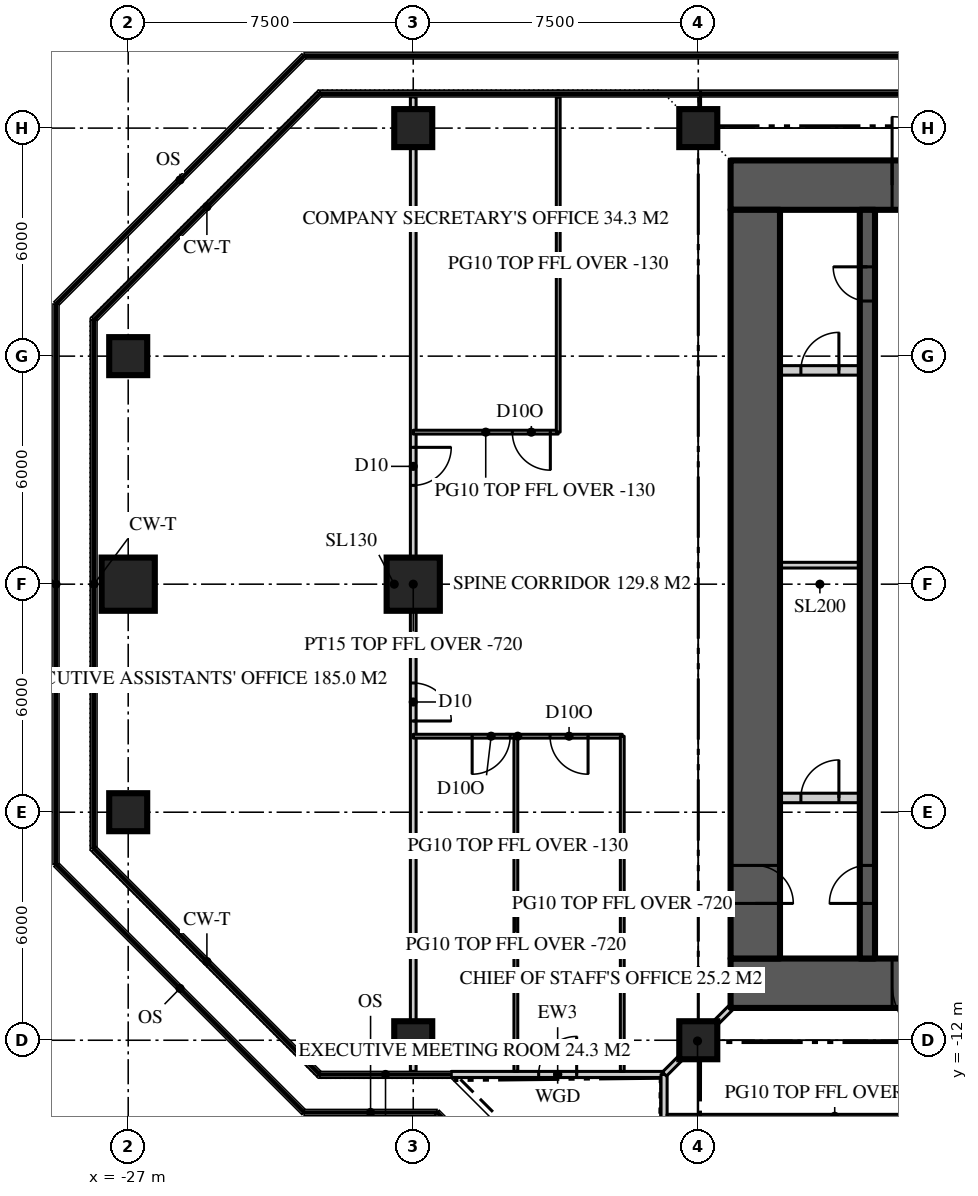
"""IFC4 building model, lengths in metres.
Left out: names, types, materials, properties, quantities, classifications, styles, units other than length and angle.
Written with IfcOpenShell. Run it as: python <this file> out.ifc"""

import sys

from ifc_helpers import new_model, si_unit, direction, frame, frame_2d, origin, origin_2d, place, context, subcontext, project, spatial, rectangle, extrude, element, fill, save


model = new_model("IFC4")
c1 = context("Model", 3, precision=1e-05, world=origin(), true_north=direction((0.0, 1.0)))
c2 = subcontext(c1, "Body", "Model", "MODEL_VIEW")
j1 = project(units=[si_unit("LENGTHUNIT", "METRE"), si_unit("PLANEANGLEUNIT", "RADIAN")], contexts=[c1])
p1 = place(None, origin())
s1 = spatial("IfcSite", under=j1, at=p1, CompositionType="ELEMENT")
p2 = place(p1, origin())
s2 = spatial("IfcBuilding", under=s1, at=p2, CompositionType="ELEMENT")
p3 = place(p2, frame((0.0, 0.0, 290.7)))
s3 = spatial("IfcBuildingStorey", under=s2, at=p3, CompositionType="ELEMENT", Elevation=290.7)
p4 = place(p3, frame((-11.15, 10.5, 0.0), z_axis=(0.0, 0.0, 1.0), x_axis=(1.0, 0.0, 0.0)))
e1 = element("IfcWall", 1, at=p4, inside=s3, PredefinedType="SHEAR", context=c2, shape_type="SweptSolid", body=[
    extrude(rectangle(XDim=22.3, YDim=1.3, at=frame_2d((11.15, 0.0))), origin(), (0.0, 0.0, 1.0), 3.9),
])
p5 = place(p4, frame((4.25, 0.0, 0.0)))
e2 = element("IfcOpeningElement", 2, at=p5, cuts=e1, PredefinedType="OPENING", context=c2, shape_type="SweptSolid", body=[
    extrude(rectangle(XDim=1.8, YDim=2.2, at=frame_2d((0.9, 1.1))), frame((0.0, 0.66, 0.0), z_axis=(0.0, -1.0, 0.0), x_axis=(1.0, 0.0, 0.0)), (0.0, 0.0, 1.0), 1.32),
])
p6 = place(p4, frame((16.25, 0.0, 0.0)))
e3 = element("IfcOpeningElement", 3, at=p6, cuts=e1, PredefinedType="OPENING", context=c2, shape_type="SweptSolid", body=[
    extrude(rectangle(XDim=1.8, YDim=2.2, at=frame_2d((0.9, 1.1))), frame((0.0, 0.66, 0.0), z_axis=(0.0, -1.0, 0.0), x_axis=(1.0, 0.0, 0.0)), (0.0, 0.0, 1.0), 1.32),
])
p7 = place(p3, frame((11.15, -10.5, 0.0), z_axis=(0.0, 0.0, 1.0), x_axis=(-1.0, 0.0, 0.0)))
e4 = element("IfcWall", 4, at=p7, inside=s3, PredefinedType="SHEAR", context=c2, shape_type="SweptSolid", body=[
    extrude(rectangle(XDim=22.3, YDim=1.3, at=frame_2d((11.15, 0.0))), origin(), (0.0, 0.0, 1.0), 3.9),
])
p8 = place(p7, frame((16.25, 0.0, 0.0)))
e5 = element("IfcOpeningElement", 5, at=p8, cuts=e4, PredefinedType="OPENING", context=c2, shape_type="SweptSolid", body=[
    extrude(rectangle(XDim=1.8, YDim=2.2, at=frame_2d((0.9, 1.1))), frame((0.0, 0.66, 0.0), z_axis=(0.0, -1.0, 0.0), x_axis=(1.0, 0.0, 0.0)), (0.0, 0.0, 1.0), 1.32),
])
p9 = place(p7, frame((4.25, 0.0, 0.0)))
e6 = element("IfcOpeningElement", 6, at=p9, cuts=e4, PredefinedType="OPENING", context=c2, shape_type="SweptSolid", body=[
    extrude(rectangle(XDim=1.8, YDim=2.2, at=frame_2d((0.9, 1.1))), frame((0.0, 0.66, 0.0), z_axis=(0.0, -1.0, 0.0), x_axis=(1.0, 0.0, 0.0)), (0.0, 0.0, 1.0), 1.32),
])
p10 = place(p3, frame((-10.5, 9.85, 0.0), z_axis=(0.0, 0.0, 1.0), x_axis=(0.0, -1.0, 0.0)))
e7 = element("IfcWall", 7, at=p10, inside=s3, PredefinedType="SHEAR", context=c2, shape_type="SweptSolid", body=[
    extrude(rectangle(XDim=19.7, YDim=1.3, at=frame_2d((9.85, 0.0))), origin(), (0.0, 0.0, 1.0), 3.9),
])
p11 = place(p10, frame((17.25, 0.0, 0.0)))
e8 = element("IfcOpeningElement", 8, at=p11, cuts=e7, PredefinedType="OPENING", context=c2, shape_type="SweptSolid", body=[
    extrude(rectangle(XDim=1.0, YDim=2.2, at=frame_2d((0.5, 1.1))), frame((0.0, 0.66, 0.0), z_axis=(0.0, -1.0, 0.0), x_axis=(1.0, 0.0, 0.0)), (0.0, 0.0, 1.0), 1.32),
])
for number, where, z_axis, x_axis in (
    (9, (-19.5, -12.0, 0.0), (0.0, 0.0, 1.0), (1.0, 0.0, 0.0)),
    (10, (-12.0, -12.0, 0.0), (0.0, 0.0, 1.0), (1.0, 0.0, 0.0)),
    (11, (-27.0, -6.0, 0.0), (0.0, 0.0, 1.0), (1.0, 0.0, 0.0)),
):
    element("IfcColumn", number, at=place(p3, frame(where, z_axis=z_axis, x_axis=x_axis)), inside=s3, PredefinedType="COLUMN", context=c2, shape_type="SweptSolid", body=[
        extrude(rectangle(XDim=1.0, YDim=1.0, at=origin_2d()), origin(), (0.0, 0.0, 1.0), 3.9),
    ])
for number, where, z_axis, x_axis in (
    (12, (-27.0, 0.0, 0.0), (0.0, 0.0, 1.0), (1.0, 0.0, 0.0)),
    (13, (-19.5, 0.0, 0.0), (0.0, 0.0, 1.0), (1.0, 0.0, 0.0)),
):
    element("IfcColumn", number, at=place(p3, frame(where, z_axis=z_axis, x_axis=x_axis)), inside=s3, PredefinedType="COLUMN", context=c2, shape_type="SweptSolid", body=[
        extrude(rectangle(XDim=1.4, YDim=1.4, at=origin_2d()), origin(), (0.0, 0.0, 1.0), 3.9),
    ])
for number, where, z_axis, x_axis in (
    (14, (-27.0, 6.0, 0.0), (0.0, 0.0, 1.0), (1.0, 0.0, 0.0)),
    (15, (-19.5, 12.0, 0.0), (0.0, 0.0, 1.0), (1.0, 0.0, 0.0)),
    (16, (-12.0, 12.0, 0.0), (0.0, 0.0, 1.0), (1.0, 0.0, 0.0)),
):
    element("IfcColumn", number, at=place(p3, frame(where, z_axis=z_axis, x_axis=x_axis)), inside=s3, PredefinedType="COLUMN", context=c2, shape_type="SweptSolid", body=[
        extrude(rectangle(XDim=1.0, YDim=1.0, at=origin_2d()), origin(), (0.0, 0.0, 1.0), 3.9),
    ])
p12 = place(p3, frame((-18.5, -12.9, 0.0), z_axis=(0.0, 0.0, 1.0), x_axis=(1.0, 0.0, 0.0)))
e17 = element("IfcWall", 17, at=p12, inside=s3, PredefinedType="SOLIDWALL", context=c2, shape_type="SweptSolid", body=[
    extrude(rectangle(XDim=5.6, YDim=0.16, at=frame_2d((2.8, 0.0))), origin(), (0.0, 0.0, 1.0), 3.77),
])
p13 = place(p12, frame((2.3, 0.0, 0.0)))
e18 = element("IfcOpeningElement", 18, at=p13, cuts=e17, PredefinedType="OPENING", context=c2, shape_type="SweptSolid", body=[
    extrude(rectangle(XDim=1.0, YDim=2.2, at=frame_2d((0.5, 1.1))), frame((0.0, 0.09, 0.0), z_axis=(0.0, -1.0, 0.0), x_axis=(1.0, 0.0, 0.0)), (0.0, 0.0, 1.0), 0.18),
])
p14 = place(p3, frame((-12.9, -12.9, 0.0), z_axis=(0.0, 0.0, 1.0), x_axis=(0.0, -1.0, 0.0)))
e19 = element("IfcWall", 19, at=p14, inside=s3, PredefinedType="SOLIDWALL", context=c2, shape_type="SweptSolid", body=[
    extrude(rectangle(XDim=5.6, YDim=0.16, at=frame_2d((2.8, 0.0))), origin(), (0.0, 0.0, 1.0), 3.77),
])
p15 = place(p3, frame((-7.55, -9.85, 0.0), z_axis=(0.0, 0.0, 1.0), x_axis=(0.0, 1.0, 0.0)))
e20 = element("IfcWall", 20, at=p15, inside=s3, PredefinedType="SHEAR", context=c2, shape_type="SweptSolid", body=[
    extrude(rectangle(XDim=19.7, YDim=0.4, at=frame_2d((9.85, 0.0))), origin(), (0.0, 0.0, 1.0), 3.9),
])
p16 = place(p15, frame((1.45, 0.0, 0.0)))
e21 = element("IfcOpeningElement", 21, at=p16, cuts=e20, PredefinedType="OPENING", context=c2, shape_type="SweptSolid", body=[
    extrude(rectangle(XDim=1.0, YDim=2.2, at=frame_2d((0.5, 1.1))), frame((0.0, 0.21, 0.0), z_axis=(0.0, -1.0, 0.0), x_axis=(1.0, 0.0, 0.0)), (0.0, 0.0, 1.0), 0.42),
])
p17 = place(p15, frame((17.3, 0.0, 0.0)))
e22 = element("IfcOpeningElement", 22, at=p17, cuts=e20, PredefinedType="OPENING", context=c2, shape_type="SweptSolid", body=[
    extrude(rectangle(XDim=0.9, YDim=2.1, at=frame_2d((0.45, 1.05))), frame((0.0, 0.21, 0.0), z_axis=(0.0, -1.0, 0.0), x_axis=(1.0, 0.0, 0.0)), (0.0, 0.0, 1.0), 0.42),
])
p18 = place(p3, frame((-9.85, 5.625, 0.0), z_axis=(0.0, 0.0, 1.0), x_axis=(1.0, 0.0, 0.0)))
e23 = element("IfcWall", 23, at=p18, inside=s3, PredefinedType="SOLIDWALL", context=c2, shape_type="SweptSolid", body=[
    extrude(rectangle(XDim=2.1, YDim=0.25, at=frame_2d((1.05, 0.0))), origin(), (0.0, 0.0, 1.0), 3.7),
])
p19 = place(p18, frame((0.55, 0.0, 0.0)))
e24 = element("IfcOpeningElement", 24, at=p19, cuts=e23, PredefinedType="OPENING", context=c2, shape_type="SweptSolid", body=[
    extrude(rectangle(XDim=1.0, YDim=2.2, at=frame_2d((0.5, 1.1))), frame((0.0, 0.135, 0.0), z_axis=(0.0, -1.0, 0.0), x_axis=(1.0, 0.0, 0.0)), (0.0, 0.0, 1.0), 0.27),
])
p20 = place(p3, frame((-9.85, -5.625, 0.0), z_axis=(0.0, 0.0, 1.0), x_axis=(1.0, 0.0, 0.0)))
e25 = element("IfcWall", 25, at=p20, inside=s3, PredefinedType="SOLIDWALL", context=c2, shape_type="SweptSolid", body=[
    extrude(rectangle(XDim=2.1, YDim=0.25, at=frame_2d((1.05, 0.0))), origin(), (0.0, 0.0, 1.0), 3.7),
])
p21 = place(p20, frame((0.55, 0.0, 0.0)))
e26 = element("IfcOpeningElement", 26, at=p21, cuts=e25, PredefinedType="OPENING", context=c2, shape_type="SweptSolid", body=[
    extrude(rectangle(XDim=1.0, YDim=2.2, at=frame_2d((0.5, 1.1))), frame((0.0, 0.135, 0.0), z_axis=(0.0, -1.0, 0.0), x_axis=(1.0, 0.0, 0.0)), (0.0, 0.0, 1.0), 0.27),
])
p22 = place(p3, frame((-19.5, 12.82, 0.0), z_axis=(0.0, 0.0, 1.0), x_axis=(0.0, -1.0, 0.0)))
e27 = element("IfcWall", 27, at=p22, inside=s3, PredefinedType="PARTITIONING", context=c2, shape_type="SweptSolid", body=[
    extrude(rectangle(XDim=25.64, YDim=0.15, at=frame_2d((12.82, 0.0))), origin(), (0.0, 0.0, 1.0), 3.18),
])
p23 = place(p22, frame((15.42, 0.0, 0.0)))
e28 = element("IfcOpeningElement", 28, at=p23, cuts=e27, PredefinedType="OPENING", context=c2, shape_type="SweptSolid", body=[
    extrude(rectangle(XDim=1.0, YDim=2.2, at=frame_2d((0.5, 1.1))), frame((0.0, 0.085, 0.0), z_axis=(0.0, -1.0, 0.0), x_axis=(1.0, 0.0, 0.0)), (0.0, 0.0, 1.0), 0.17),
])
p24 = place(p22, frame((9.22, 0.0, 0.0)))
e29 = element("IfcOpeningElement", 29, at=p24, cuts=e27, PredefinedType="OPENING", context=c2, shape_type="SweptSolid", body=[
    extrude(rectangle(XDim=1.0, YDim=2.2, at=frame_2d((0.5, 1.1))), frame((0.0, 0.085, 0.0), z_axis=(0.0, -1.0, 0.0), x_axis=(1.0, 0.0, 0.0)), (0.0, 0.0, 1.0), 0.17),
])
p25 = place(p3, frame((-14.0, -4.0, 0.0), z_axis=(0.0, 0.0, 1.0), x_axis=(-1.0, 0.0, 0.0)))
e30 = element("IfcWall", 30, at=p25, inside=s3, PredefinedType="PARTITIONING", context=c2, shape_type="SweptSolid", body=[
    extrude(rectangle(XDim=5.5, YDim=0.1, at=frame_2d((2.75, 0.0))), origin(), (0.0, 0.0, 1.0), 3.77),
])
p26 = place(p25, frame((0.9, 0.0, 0.0)))
e31 = element("IfcOpeningElement", 31, at=p26, cuts=e30, PredefinedType="OPENING", context=c2, shape_type="SweptSolid", body=[
    extrude(rectangle(XDim=1.0, YDim=2.2, at=frame_2d((0.5, 1.1))), frame((0.0, 0.06, 0.0), z_axis=(0.0, -1.0, 0.0), x_axis=(1.0, 0.0, 0.0)), (0.0, 0.0, 1.0), 0.12),
])
p27 = place(p25, frame((2.95, 0.0, 0.0)))
e32 = element("IfcOpeningElement", 32, at=p27, cuts=e30, PredefinedType="OPENING", context=c2, shape_type="SweptSolid", body=[
    extrude(rectangle(XDim=1.0, YDim=2.2, at=frame_2d((0.5, 1.1))), frame((0.0, 0.06, 0.0), z_axis=(0.0, -1.0, 0.0), x_axis=(1.0, 0.0, 0.0)), (0.0, 0.0, 1.0), 0.12),
])
for number, where, z_axis, x_axis in (
    (33, (-14.0, -4.0, 0.0), (0.0, 0.0, 1.0), (0.0, -1.0, 0.0)),
    (34, (-16.8, -4.0, 0.0), (0.0, 0.0, 1.0), (0.0, -1.0, 0.0)),
):
    element("IfcWall", number, at=place(p3, frame(where, z_axis=z_axis, x_axis=x_axis)), inside=s3, PredefinedType="PARTITIONING", context=c2, shape_type="SweptSolid", body=[
        extrude(rectangle(XDim=8.82, YDim=0.1, at=frame_2d((4.41, 0.0))), origin(), (0.0, 0.0, 1.0), 3.18),
    ])
p28 = place(p3, frame((-15.685, 4.0, 0.0), z_axis=(0.0, 0.0, 1.0), x_axis=(-1.0, 0.0, 0.0)))
e35 = element("IfcWall", 35, at=p28, inside=s3, PredefinedType="PARTITIONING", context=c2, shape_type="SweptSolid", body=[
    extrude(rectangle(XDim=3.815, YDim=0.1, at=frame_2d((1.907, 0.0))), origin(), (0.0, 0.0, 1.0), 3.77),
])
p29 = place(p28, frame((0.208, 0.0, 0.0)))
e36 = element("IfcOpeningElement", 36, at=p29, cuts=e35, PredefinedType="OPENING", context=c2, shape_type="SweptSolid", body=[
    extrude(rectangle(XDim=1.0, YDim=2.2, at=frame_2d((0.5, 1.1))), frame((0.0, 0.06, 0.0), z_axis=(0.0, -1.0, 0.0), x_axis=(1.0, 0.0, 0.0)), (0.0, 0.0, 1.0), 0.12),
])
p30 = place(p3, frame((-15.685, 4.0, 0.0), z_axis=(0.0, 0.0, 1.0), x_axis=(0.0, 1.0, 0.0)))
e37 = element("IfcWall", 37, at=p30, inside=s3, PredefinedType="PARTITIONING", context=c2, shape_type="SweptSolid", body=[
    extrude(rectangle(XDim=8.82, YDim=0.1, at=frame_2d((4.41, 0.0))), origin(), (0.0, 0.0, 1.0), 3.77),
])
p31 = place(p3, frame((-4.0, -14.0, 0.0), z_axis=(0.0, 0.0, 1.0), x_axis=(-1.0, 0.0, 0.0)))
e38 = element("IfcWall", 38, at=p31, inside=s3, PredefinedType="PARTITIONING", context=c2, shape_type="SweptSolid", body=[
    extrude(rectangle(XDim=8.82, YDim=0.1, at=frame_2d((4.41, 0.0))), origin(), (0.0, 0.0, 1.0), 3.18),
])
p32 = place(p3, frame((-11.15, -11.15, 0.0), z_axis=(0.0, 0.0, 1.0), x_axis=(-0.707106781187, -0.707106781187, 0.0)))
e39 = element("IfcWall", 39, at=p32, inside=s3, PredefinedType="PARTITIONING", context=c2, shape_type="SweptSolid", body=[
    extrude(rectangle(XDim=2.461, YDim=0.15, at=frame_2d((1.23, 0.0))), origin(), (0.0, 0.0, 1.0), 3.22),
])
p33 = place(p3, frame((-9.85, 0.5, 0.0), z_axis=(0.0, 0.0, 1.0), x_axis=(1.0, 0.0, 0.0)))
e40 = element("IfcWall", 40, at=p33, inside=s3, PredefinedType="SOLIDWALL", context=c2, shape_type="SweptSolid", body=[
    extrude(rectangle(XDim=2.1, YDim=0.15, at=frame_2d((1.05, 0.0))), origin(), (0.0, 0.0, 1.0), 3.77),
])
p34 = place(p13, origin())
e41 = element("IfcDoor", 41, at=p34, inside=s3, OperationType="SINGLE_SWING_RIGHT", PredefinedType="DOOR", context=c2, shape_type="SweptSolid", body=[
    extrude(rectangle(XDim=1.0, YDim=2.2, at=frame_2d((0.5, 1.1))), frame((0.0, 0.025, 0.0), z_axis=(0.0, -1.0, 0.0), x_axis=(1.0, 0.0, 0.0)), (0.0, 0.0, 1.0), 0.05),
])
fill(e18, e41)
p35 = place(p5, origin())
e42 = element("IfcDoor", 42, at=p35, inside=s3, OperationType="DOUBLE_DOOR_DOUBLE_SWING", PredefinedType="DOOR", context=c2, shape_type="SweptSolid", body=[
    extrude(rectangle(XDim=1.8, YDim=2.2, at=frame_2d((0.9, 1.1))), frame((0.0, 0.025, 0.0), z_axis=(0.0, -1.0, 0.0), x_axis=(1.0, 0.0, 0.0)), (0.0, 0.0, 1.0), 0.05),
])
fill(e2, e42)
p36 = place(p8, origin())
e43 = element("IfcDoor", 43, at=p36, inside=s3, OperationType="DOUBLE_DOOR_DOUBLE_SWING", PredefinedType="DOOR", context=c2, shape_type="SweptSolid", body=[
    extrude(rectangle(XDim=1.8, YDim=2.2, at=frame_2d((0.9, 1.1))), frame((0.0, 0.025, 0.0), z_axis=(0.0, -1.0, 0.0), x_axis=(1.0, 0.0, 0.0)), (0.0, 0.0, 1.0), 0.05),
])
fill(e5, e43)
p37 = place(p16, origin())
e44 = element("IfcDoor", 44, at=p37, inside=s3, OperationType="SINGLE_SWING_LEFT", PredefinedType="DOOR", context=c2, shape_type="SweptSolid", body=[
    extrude(rectangle(XDim=1.0, YDim=2.2, at=frame_2d((0.5, 1.1))), frame((0.0, 0.025, 0.0), z_axis=(0.0, -1.0, 0.0), x_axis=(1.0, 0.0, 0.0)), (0.0, 0.0, 1.0), 0.05),
])
fill(e21, e44)
p38 = place(p11, origin())
e45 = element("IfcDoor", 45, at=p38, inside=s3, OperationType="SINGLE_SWING_RIGHT", PredefinedType="DOOR", context=c2, shape_type="SweptSolid", body=[
    extrude(rectangle(XDim=1.0, YDim=2.2, at=frame_2d((0.5, 1.1))), frame((0.0, 0.025, 0.0), z_axis=(0.0, -1.0, 0.0), x_axis=(1.0, 0.0, 0.0)), (0.0, 0.0, 1.0), 0.05),
])
fill(e8, e45)
p39 = place(p17, origin())
e46 = element("IfcDoor", 46, at=p39, inside=s3, OperationType="SINGLE_SWING_RIGHT", PredefinedType="DOOR", context=c2, shape_type="SweptSolid", body=[
    extrude(rectangle(XDim=0.9, YDim=2.1, at=frame_2d((0.45, 1.05))), frame((0.0, 0.025, 0.0), z_axis=(0.0, -1.0, 0.0), x_axis=(1.0, 0.0, 0.0)), (0.0, 0.0, 1.0), 0.05),
])
fill(e22, e46)
p40 = place(p23, origin())
e47 = element("IfcDoor", 47, at=p40, inside=s3, OperationType="SINGLE_SWING_RIGHT", PredefinedType="DOOR", context=c2, shape_type="SweptSolid", body=[
    extrude(rectangle(XDim=1.0, YDim=2.2, at=frame_2d((0.5, 1.1))), frame((0.0, 0.025, 0.0), z_axis=(0.0, -1.0, 0.0), x_axis=(1.0, 0.0, 0.0)), (0.0, 0.0, 1.0), 0.05),
])
fill(e28, e47)
p41 = place(p24, origin())
e48 = element("IfcDoor", 48, at=p41, inside=s3, OperationType="SINGLE_SWING_LEFT", PredefinedType="DOOR", context=c2, shape_type="SweptSolid", body=[
    extrude(rectangle(XDim=1.0, YDim=2.2, at=frame_2d((0.5, 1.1))), frame((0.0, 0.025, 0.0), z_axis=(0.0, -1.0, 0.0), x_axis=(1.0, 0.0, 0.0)), (0.0, 0.0, 1.0), 0.05),
])
fill(e29, e48)
p42 = place(p26, origin())
e49 = element("IfcDoor", 49, at=p42, inside=s3, OperationType="SINGLE_SWING_LEFT", PredefinedType="DOOR", context=c2, shape_type="SweptSolid", body=[
    extrude(rectangle(XDim=1.0, YDim=2.2, at=frame_2d((0.5, 1.1))), frame((0.0, 0.025, 0.0), z_axis=(0.0, -1.0, 0.0), x_axis=(1.0, 0.0, 0.0)), (0.0, 0.0, 1.0), 0.05),
])
fill(e31, e49)
p43 = place(p27, origin())
e50 = element("IfcDoor", 50, at=p43, inside=s3, OperationType="SINGLE_SWING_RIGHT", PredefinedType="DOOR", context=c2, shape_type="SweptSolid", body=[
    extrude(rectangle(XDim=1.0, YDim=2.2, at=frame_2d((0.5, 1.1))), frame((0.0, 0.025, 0.0), z_axis=(0.0, -1.0, 0.0), x_axis=(1.0, 0.0, 0.0)), (0.0, 0.0, 1.0), 0.05),
])
fill(e32, e50)
p44 = place(p29, origin())
e51 = element("IfcDoor", 51, at=p44, inside=s3, OperationType="SINGLE_SWING_LEFT", PredefinedType="DOOR", context=c2, shape_type="SweptSolid", body=[
    extrude(rectangle(XDim=1.0, YDim=2.2, at=frame_2d((0.5, 1.1))), frame((0.0, 0.025, 0.0), z_axis=(0.0, -1.0, 0.0), x_axis=(1.0, 0.0, 0.0)), (0.0, 0.0, 1.0), 0.05),
])
fill(e36, e51)
p45 = place(p19, origin())
e52 = element("IfcDoor", 52, at=p45, inside=s3, OperationType="SINGLE_SWING_RIGHT", PredefinedType="DOOR", context=c2, shape_type="SweptSolid", body=[
    extrude(rectangle(XDim=1.0, YDim=2.2, at=frame_2d((0.5, 1.1))), frame((0.0, 0.025, 0.0), z_axis=(0.0, -1.0, 0.0), x_axis=(1.0, 0.0, 0.0)), (0.0, 0.0, 1.0), 0.05),
])
fill(e24, e52)
p46 = place(p21, origin())
e53 = element("IfcDoor", 53, at=p46, inside=s3, OperationType="SINGLE_SWING_RIGHT", PredefinedType="DOOR", context=c2, shape_type="SweptSolid", body=[
    extrude(rectangle(XDim=1.0, YDim=2.2, at=frame_2d((0.5, 1.1))), frame((0.0, 0.025, 0.0), z_axis=(0.0, -1.0, 0.0), x_axis=(1.0, 0.0, 0.0)), (0.0, 0.0, 1.0), 0.05),
])
fill(e26, e53)
save(model, sys.argv[1])
